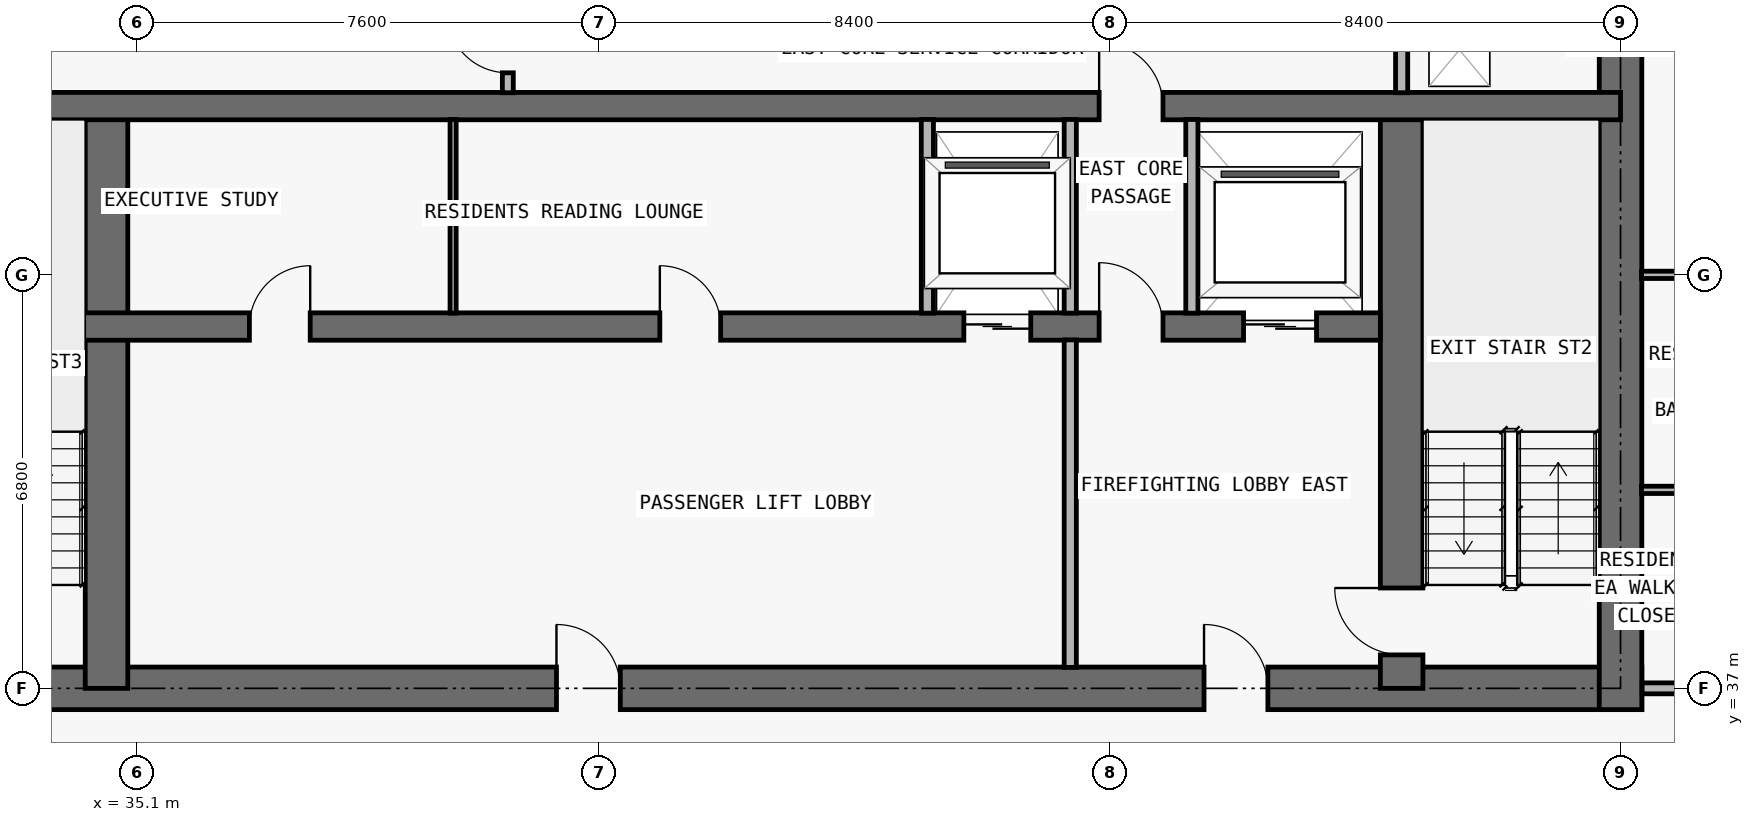
"""IFC4 building model, lengths in metres.
Left out: names, types, materials, properties, quantities, classifications, styles, units other than length and angle.
Written with IfcOpenShell. Run it as: python <this file> out.ifc"""

import sys

from ifc_helpers import new_model, si_unit, direction, frame, frame_2d, origin, place, context, subcontext, project, spatial, rectangle, extrude, element, fill, save


model = new_model("IFC4")
c1 = context("Model", 3, precision=1e-05, world=origin(), true_north=direction((0.0, 1.0)))
c2 = subcontext(c1, "Body", "Model", "MODEL_VIEW")
j1 = project(units=[si_unit("LENGTHUNIT", "METRE"), si_unit("PLANEANGLEUNIT", "RADIAN")], contexts=[c1])
p1 = place(None, origin())
s1 = spatial("IfcSite", under=j1, at=p1, CompositionType="ELEMENT")
p2 = place(p1, origin())
s2 = spatial("IfcBuilding", under=s1, at=p2, CompositionType="ELEMENT")
p3 = place(p2, frame((0.0, 0.0, 201.6)))
s3 = spatial("IfcBuildingStorey", under=s2, at=p3, CompositionType="ELEMENT", Elevation=201.6)
p4 = place(p3, frame((17.95, 37.0, 0.0), z_axis=(0.0, 0.0, 1.0), x_axis=(1.0, 0.0, 0.0)))
e1 = element("IfcWall", 1, at=p4, inside=s3, PredefinedType="SHEAR", context=c2, shape_type="SweptSolid", body=[
    extrude(rectangle(XDim=41.9, YDim=0.7, at=frame_2d((20.95, 0.0))), origin(), (0.0, 0.0, 1.0), 3.05),
])
p5 = place(p4, frame((14.35, 0.0, 0.0)))
e2 = element("IfcOpeningElement", 2, at=p5, cuts=e1, PredefinedType="OPENING", context=c2, shape_type="SweptSolid", body=[
    extrude(rectangle(XDim=1.1, YDim=2.15, at=frame_2d((0.55, 1.075))), frame((0.0, 0.36, 0.0), z_axis=(0.0, -1.0, 0.0), x_axis=(1.0, 0.0, 0.0)), (0.0, 0.0, 1.0), 0.72),
])
p6 = place(p4, frame((6.2, 0.0, 0.0)))
e3 = element("IfcOpeningElement", 3, at=p6, cuts=e1, PredefinedType="OPENING", context=c2, shape_type="SweptSolid", body=[
    extrude(rectangle(XDim=1.05, YDim=2.15, at=frame_2d((0.525, 1.075))), frame((0.0, 0.36, 0.0), z_axis=(0.0, -1.0, 0.0), x_axis=(1.0, 0.0, 0.0)), (0.0, 0.0, 1.0), 0.72),
])
p7 = place(p4, frame((34.7, 0.0, 0.0)))
e4 = element("IfcOpeningElement", 4, at=p7, cuts=e1, PredefinedType="OPENING", context=c2, shape_type="SweptSolid", body=[
    extrude(rectangle(XDim=1.05, YDim=2.15, at=frame_2d((0.525, 1.075))), frame((0.0, 0.36, 0.0), z_axis=(0.0, -1.0, 0.0), x_axis=(1.0, 0.0, 0.0)), (0.0, 0.0, 1.0), 0.72),
])
p8 = place(p4, frame((10.812, 0.0, 0.0)))
e5 = element("IfcOpeningElement", 5, at=p8, cuts=e1, PredefinedType="OPENING", context=c2, shape_type="SweptSolid", body=[
    extrude(rectangle(XDim=1.05, YDim=2.15, at=frame_2d((0.525, 1.075))), frame((0.0, 0.36, 0.0), z_axis=(0.0, -1.0, 0.0), x_axis=(1.0, 0.0, 0.0)), (0.0, 0.0, 1.0), 0.72),
])
p9 = place(p4, frame((24.05, 0.0, 0.0)))
e6 = element("IfcOpeningElement", 6, at=p9, cuts=e1, PredefinedType="OPENING", context=c2, shape_type="SweptSolid", body=[
    extrude(rectangle(XDim=1.05, YDim=2.15, at=frame_2d((0.525, 1.075))), frame((0.0, 0.36, 0.0), z_axis=(0.0, -1.0, 0.0), x_axis=(1.0, 0.0, 0.0)), (0.0, 0.0, 1.0), 0.72),
])
p10 = place(p3, frame((59.5, 36.65, 0.0), z_axis=(0.0, 0.0, 1.0), x_axis=(0.0, 1.0, 0.0)))
e7 = element("IfcWall", 7, at=p10, inside=s3, PredefinedType="SHEAR", context=c2, shape_type="SweptSolid", body=[
    extrude(rectangle(XDim=13.95, YDim=0.7, at=frame_2d((6.975, 0.0))), origin(), (0.0, 0.0, 1.0), 3.05),
])
p11 = place(p3, frame((55.9, 37.0, 0.0), z_axis=(0.0, 0.0, 1.0), x_axis=(0.0, 1.0, 0.0)))
e8 = element("IfcWall", 8, at=p11, inside=s3, PredefinedType="SHEAR", context=c2, shape_type="SweptSolid", body=[
    extrude(rectangle(XDim=9.575, YDim=0.7, at=frame_2d((4.788, 0.0))), origin(), (0.0, 0.0, 1.0), 3.05),
])
p12 = place(p11, frame((0.55, 0.0, 0.0)))
e9 = element("IfcOpeningElement", 9, at=p12, cuts=e8, PredefinedType="OPENING", context=c2, shape_type="SweptSolid", body=[
    extrude(rectangle(XDim=1.1, YDim=2.15, at=frame_2d((0.55, 1.075))), frame((0.0, 0.36, 0.0), z_axis=(0.0, -1.0, 0.0), x_axis=(1.0, 0.0, 0.0)), (0.0, 0.0, 1.0), 0.72),
])
p13 = place(p3, frame((34.6, 37.0, 0.0), z_axis=(0.0, 0.0, 1.0), x_axis=(0.0, 1.0, 0.0)))
e10 = element("IfcWall", 10, at=p13, inside=s3, PredefinedType="SHEAR", context=c2, shape_type="SweptSolid", body=[
    extrude(rectangle(XDim=9.575, YDim=0.7, at=frame_2d((4.788, 0.0))), origin(), (0.0, 0.0, 1.0), 3.05),
])
p14 = place(p3, frame((22.25, 42.95, 0.0), z_axis=(0.0, 0.0, 1.0), x_axis=(1.0, 0.0, 0.0)))
e11 = element("IfcWall", 11, at=p14, inside=s3, PredefinedType="SHEAR", context=c2, shape_type="SweptSolid", body=[
    extrude(rectangle(XDim=33.3, YDim=0.45, at=frame_2d((16.65, 0.0))), origin(), (0.0, 0.0, 1.0), 3.05),
])
p15 = place(p14, frame((1.05, 0.0, 0.0)))
e12 = element("IfcOpeningElement", 12, at=p15, cuts=e11, PredefinedType="OPENING", context=c2, shape_type="SweptSolid", body=[
    extrude(rectangle(XDim=1.2, YDim=2.2, at=frame_2d((0.6, 1.1))), frame((0.0, 0.235, 0.0), z_axis=(0.0, -1.0, 0.0), x_axis=(1.0, 0.0, 0.0)), (0.0, 0.0, 1.0), 0.47),
])
p16 = place(p14, frame((31.05, 0.0, 0.0)))
e13 = element("IfcOpeningElement", 13, at=p16, cuts=e11, PredefinedType="OPENING", context=c2, shape_type="SweptSolid", body=[
    extrude(rectangle(XDim=1.2, YDim=2.2, at=frame_2d((0.6, 1.1))), frame((0.0, 0.235, 0.0), z_axis=(0.0, -1.0, 0.0), x_axis=(1.0, 0.0, 0.0)), (0.0, 0.0, 1.0), 0.47),
])
p17 = place(p14, frame((26.45, 0.0, 0.0)))
e14 = element("IfcOpeningElement", 14, at=p17, cuts=e11, PredefinedType="OPENING", context=c2, shape_type="SweptSolid", body=[
    extrude(rectangle(XDim=1.1, YDim=2.2, at=frame_2d((0.55, 1.1))), frame((0.0, 0.235, 0.0), z_axis=(0.0, -1.0, 0.0), x_axis=(1.0, 0.0, 0.0)), (0.0, 0.0, 1.0), 0.47),
])
p18 = place(p14, frame((5.95, 0.0, 0.0)))
e15 = element("IfcOpeningElement", 15, at=p18, cuts=e11, PredefinedType="OPENING", context=c2, shape_type="SweptSolid", body=[
    extrude(rectangle(XDim=1.1, YDim=2.2, at=frame_2d((0.55, 1.1))), frame((0.0, 0.235, 0.0), z_axis=(0.0, -1.0, 0.0), x_axis=(1.0, 0.0, 0.0)), (0.0, 0.0, 1.0), 0.47),
])
p19 = place(p14, frame((3.625, 0.0, 0.0)))
e16 = element("IfcOpeningElement", 16, at=p19, cuts=e11, PredefinedType="OPENING", context=c2, shape_type="SweptSolid", body=[
    extrude(rectangle(XDim=1.05, YDim=2.15, at=frame_2d((0.525, 1.075))), frame((0.0, 0.235, 0.0), z_axis=(0.0, -1.0, 0.0), x_axis=(1.0, 0.0, 0.0)), (0.0, 0.0, 1.0), 0.47),
])
p20 = place(p14, frame((28.675, 0.0, 0.0)))
e17 = element("IfcOpeningElement", 17, at=p20, cuts=e11, PredefinedType="OPENING", context=c2, shape_type="SweptSolid", body=[
    extrude(rectangle(XDim=1.05, YDim=2.15, at=frame_2d((0.525, 1.075))), frame((0.0, 0.235, 0.0), z_axis=(0.0, -1.0, 0.0), x_axis=(1.0, 0.0, 0.0)), (0.0, 0.0, 1.0), 0.47),
])
p21 = place(p14, frame((14.7, 0.0, 0.0)))
e18 = element("IfcOpeningElement", 18, at=p21, cuts=e11, PredefinedType="OPENING", context=c2, shape_type="SweptSolid", body=[
    extrude(rectangle(XDim=1.0, YDim=2.2, at=frame_2d((0.5, 1.1))), frame((0.0, 0.235, 0.0), z_axis=(0.0, -1.0, 0.0), x_axis=(1.0, 0.0, 0.0)), (0.0, 0.0, 1.0), 0.47),
])
p22 = place(p14, frame((21.45, 0.0, 0.0)))
e19 = element("IfcOpeningElement", 19, at=p22, cuts=e11, PredefinedType="OPENING", context=c2, shape_type="SweptSolid", body=[
    extrude(rectangle(XDim=1.0, YDim=2.2, at=frame_2d((0.5, 1.1))), frame((0.0, 0.235, 0.0), z_axis=(0.0, -1.0, 0.0), x_axis=(1.0, 0.0, 0.0)), (0.0, 0.0, 1.0), 0.47),
])
p23 = place(p3, frame((18.3, 46.575, 0.0), z_axis=(0.0, 0.0, 1.0), x_axis=(1.0, 0.0, 0.0)))
e20 = element("IfcWall", 20, at=p23, inside=s3, PredefinedType="SHEAR", context=c2, shape_type="SweptSolid", body=[
    extrude(rectangle(XDim=41.2, YDim=0.45, at=frame_2d((20.6, 0.0))), origin(), (0.0, 0.0, 1.0), 3.05),
])
p24 = place(p23, frame((7.6, 0.0, 0.0)))
e21 = element("IfcOpeningElement", 21, at=p24, cuts=e20, PredefinedType="OPENING", context=c2, shape_type="SweptSolid", body=[
    extrude(rectangle(XDim=1.0, YDim=2.2, at=frame_2d((0.5, 1.1))), frame((0.0, 0.235, 0.0), z_axis=(0.0, -1.0, 0.0), x_axis=(1.0, 0.0, 0.0)), (0.0, 0.0, 1.0), 0.47),
])
p25 = place(p23, frame((32.625, 0.0, 0.0)))
e22 = element("IfcOpeningElement", 22, at=p25, cuts=e20, PredefinedType="OPENING", context=c2, shape_type="SweptSolid", body=[
    extrude(rectangle(XDim=1.05, YDim=2.15, at=frame_2d((0.525, 1.075))), frame((0.0, 0.235, 0.0), z_axis=(0.0, -1.0, 0.0), x_axis=(1.0, 0.0, 0.0)), (0.0, 0.0, 1.0), 0.47),
])
p26 = place(p3, frame((40.3, 43.17, 0.0), z_axis=(0.0, 0.0, 1.0), x_axis=(0.0, 1.0, 0.0)))
e23 = element("IfcWall", 23, at=p26, inside=s3, PredefinedType="MOVABLE", context=c2, shape_type="SweptSolid", body=[
    extrude(rectangle(XDim=3.185, YDim=0.1, at=frame_2d((1.593, 0.0))), origin(), (0.0, 0.0, 1.0), 3.05),
])
p27 = place(p3, frame((41.2, 46.795, 0.0), z_axis=(0.0, 0.0, 1.0), x_axis=(0.0, 1.0, 0.0)))
e24 = element("IfcWall", 24, at=p27, inside=s3, PredefinedType="PARTITIONING", context=c2, shape_type="SweptSolid", body=[
    extrude(rectangle(XDim=3.16, YDim=0.18, at=frame_2d((1.58, 0.0))), origin(), (0.0, 0.0, 1.0), 3.05),
])
p28 = place(p27, frame((0.327, 0.0, 0.0)))
e25 = element("IfcOpeningElement", 25, at=p28, cuts=e24, PredefinedType="OPENING", context=c2, shape_type="SweptSolid", body=[
    extrude(rectangle(XDim=1.0, YDim=2.2, at=frame_2d((0.5, 1.1))), frame((0.0, 0.1, 0.0), z_axis=(0.0, -1.0, 0.0), x_axis=(1.0, 0.0, 0.0)), (0.0, 0.0, 1.0), 0.2),
])
p29 = place(p3, frame((48.1, 43.17, 0.0), z_axis=(0.0, 0.0, 1.0), x_axis=(0.0, 1.0, 0.0)))
e26 = element("IfcWall", 26, at=p29, inside=s3, PredefinedType="PARTITIONING", context=c2, shape_type="SweptSolid", body=[
    extrude(rectangle(XDim=3.185, YDim=0.2, at=frame_2d((1.593, 0.0))), origin(), (0.0, 0.0, 1.0), 3.05),
])
p30 = place(p3, frame((50.45, 37.345, 0.0), z_axis=(0.0, 0.0, 1.0), x_axis=(0.0, 1.0, 0.0)))
e27 = element("IfcWall", 27, at=p30, inside=s3, PredefinedType="PARTITIONING", context=c2, shape_type="SweptSolid", body=[
    extrude(rectangle(XDim=5.385, YDim=0.2, at=frame_2d((2.692, 0.0))), origin(), (0.0, 0.0, 1.0), 3.05),
])
for number, where, z_axis, x_axis in (
    (28, (50.45, 43.17, 0.0), (0.0, 0.0, 1.0), (0.0, 1.0, 0.0)),
    (29, (52.45, 43.17, 0.0), (0.0, 0.0, 1.0), (0.0, 1.0, 0.0)),
):
    element("IfcWall", number, at=place(p3, frame(where, z_axis=z_axis, x_axis=x_axis)), inside=s3, PredefinedType="PARTITIONING", context=c2, shape_type="SweptSolid", body=[
        extrude(rectangle(XDim=3.185, YDim=0.2, at=frame_2d((1.593, 0.0))), origin(), (0.0, 0.0, 1.0), 3.05),
    ])
p31 = place(p3, frame((55.9, 46.795, 0.0), z_axis=(0.0, 0.0, 1.0), x_axis=(0.0, 1.0, 0.0)))
e30 = element("IfcWall", 30, at=p31, inside=s3, PredefinedType="PARTITIONING", context=c2, shape_type="SweptSolid", body=[
    extrude(rectangle(XDim=3.16, YDim=0.2, at=frame_2d((1.58, 0.0))), origin(), (0.0, 0.0, 1.0), 3.05),
])
p32 = place(p3, frame((59.855, 37.0, 0.0), z_axis=(0.0, 0.0, 1.0), x_axis=(1.0, 0.0, 0.0)))
e31 = element("IfcWall", 31, at=p32, inside=s3, PredefinedType="PARTITIONING", context=c2, shape_type="SweptSolid", body=[
    extrude(rectangle(XDim=7.845, YDim=0.18, at=frame_2d((3.922, 0.0))), origin(), (0.0, 0.0, 1.0), 3.05),
])
p33 = place(p32, frame((3.349, 0.0, 0.0)))
e32 = element("IfcOpeningElement", 32, at=p33, cuts=e31, PredefinedType="OPENING", context=c2, shape_type="SweptSolid", body=[
    extrude(rectangle(XDim=1.0, YDim=2.2, at=frame_2d((0.5, 1.1))), frame((0.0, 0.1, 0.0), z_axis=(0.0, -1.0, 0.0), x_axis=(1.0, 0.0, 0.0)), (0.0, 0.0, 1.0), 0.2),
])
p34 = place(p3, frame((59.845, 40.264, 0.0), z_axis=(0.0, 0.0, 1.0), x_axis=(1.0, 0.0, 0.0)))
e33 = element("IfcWall", 33, at=p34, inside=s3, PredefinedType="PARTITIONING", context=c2, shape_type="SweptSolid", body=[
    extrude(rectangle(XDim=2.305, YDim=0.12, at=frame_2d((1.152, 0.0))), origin(), (0.0, 0.0, 1.0), 3.05),
])
p35 = place(p3, frame((59.845, 43.8, 0.0), z_axis=(0.0, 0.0, 1.0), x_axis=(1.0, 0.0, 0.0)))
e34 = element("IfcWall", 34, at=p35, inside=s3, PredefinedType="PARTITIONING", context=c2, shape_type="SweptSolid", body=[
    extrude(rectangle(XDim=11.56, YDim=0.12, at=frame_2d((5.78, 0.0))), origin(), (0.0, 0.0, 1.0), 2.418),
])
p36 = place(p35, frame((3.409, 0.0, 0.0)))
e35 = element("IfcOpeningElement", 35, at=p36, cuts=e34, PredefinedType="OPENING", context=c2, shape_type="SweptSolid", body=[
    extrude(rectangle(XDim=0.9, YDim=2.15, at=frame_2d((0.45, 1.075))), frame((0.0, 0.07, 0.0), z_axis=(0.0, -1.0, 0.0), x_axis=(1.0, 0.0, 0.0)), (0.0, 0.0, 1.0), 0.14),
])
p37 = place(p35, frame((0.728, 0.0, 0.0)))
e36 = element("IfcOpeningElement", 36, at=p37, cuts=e34, PredefinedType="OPENING", context=c2, shape_type="SweptSolid", body=[
    extrude(rectangle(XDim=0.85, YDim=2.1, at=frame_2d((0.425, 1.05))), frame((0.0, 0.07, 0.0), z_axis=(0.0, -1.0, 0.0), x_axis=(1.0, 0.0, 0.0)), (0.0, 0.0, 1.0), 0.14),
])
p38 = place(p16, origin())
e37 = element("IfcDoor", 37, at=p38, inside=s3, OperationType="DOUBLE_DOOR_SLIDING", PredefinedType="DOOR", context=c2, shape_type="SweptSolid", body=[
    extrude(rectangle(XDim=1.2, YDim=2.2, at=frame_2d((0.6, 1.1))), frame((0.0, 0.025, 0.0), z_axis=(0.0, -1.0, 0.0), x_axis=(1.0, 0.0, 0.0)), (0.0, 0.0, 1.0), 0.05),
])
fill(e13, e37)
p39 = place(p17, origin())
e38 = element("IfcDoor", 38, at=p39, inside=s3, OperationType="DOUBLE_DOOR_SLIDING", PredefinedType="DOOR", context=c2, shape_type="SweptSolid", body=[
    extrude(rectangle(XDim=1.1, YDim=2.2, at=frame_2d((0.55, 1.1))), frame((0.0, 0.025, 0.0), z_axis=(0.0, -1.0, 0.0), x_axis=(1.0, 0.0, 0.0)), (0.0, 0.0, 1.0), 0.05),
])
fill(e14, e38)
p40 = place(p7, origin())
e39 = element("IfcDoor", 39, at=p40, inside=s3, OperationType="SINGLE_SWING_LEFT", PredefinedType="DOOR", context=c2, shape_type="SweptSolid", body=[
    extrude(rectangle(XDim=1.05, YDim=2.15, at=frame_2d((0.525, 1.075))), frame((0.0, 0.025, 0.0), z_axis=(0.0, -1.0, 0.0), x_axis=(1.0, 0.0, 0.0)), (0.0, 0.0, 1.0), 0.05),
])
fill(e4, e39)
p41 = place(p12, origin())
e40 = element("IfcDoor", 40, at=p41, inside=s3, OperationType="SINGLE_SWING_RIGHT", PredefinedType="DOOR", context=c2, shape_type="SweptSolid", body=[
    extrude(rectangle(XDim=1.1, YDim=2.15, at=frame_2d((0.55, 1.075))), frame((0.0, 0.025, 0.0), z_axis=(0.0, -1.0, 0.0), x_axis=(1.0, 0.0, 0.0)), (0.0, 0.0, 1.0), 0.05),
])
fill(e9, e40)
p42 = place(p20, origin())
e41 = element("IfcDoor", 41, at=p42, inside=s3, OperationType="SINGLE_SWING_LEFT", PredefinedType="DOOR", context=c2, shape_type="SweptSolid", body=[
    extrude(rectangle(XDim=1.05, YDim=2.15, at=frame_2d((0.525, 1.075))), frame((0.0, 0.025, 0.0), z_axis=(0.0, -1.0, 0.0), x_axis=(1.0, 0.0, 0.0)), (0.0, 0.0, 1.0), 0.05),
])
fill(e17, e41)
p43 = place(p9, origin())
e42 = element("IfcDoor", 42, at=p43, inside=s3, OperationType="SINGLE_SWING_LEFT", PredefinedType="DOOR", context=c2, shape_type="SweptSolid", body=[
    extrude(rectangle(XDim=1.05, YDim=2.15, at=frame_2d((0.525, 1.075))), frame((0.0, 0.025, 0.0), z_axis=(0.0, -1.0, 0.0), x_axis=(1.0, 0.0, 0.0)), (0.0, 0.0, 1.0), 0.05),
])
fill(e6, e42)
p44 = place(p21, origin())
e43 = element("IfcDoor", 43, at=p44, inside=s3, OperationType="SINGLE_SWING_RIGHT", PredefinedType="DOOR", context=c2, shape_type="SweptSolid", body=[
    extrude(rectangle(XDim=1.0, YDim=2.2, at=frame_2d((0.5, 1.1))), frame((0.0, 0.025, 0.0), z_axis=(0.0, -1.0, 0.0), x_axis=(1.0, 0.0, 0.0)), (0.0, 0.0, 1.0), 0.05),
])
fill(e18, e43)
p45 = place(p22, origin())
e44 = element("IfcDoor", 44, at=p45, inside=s3, OperationType="SINGLE_SWING_LEFT", PredefinedType="DOOR", context=c2, shape_type="SweptSolid", body=[
    extrude(rectangle(XDim=1.0, YDim=2.2, at=frame_2d((0.5, 1.1))), frame((0.0, 0.025, 0.0), z_axis=(0.0, -1.0, 0.0), x_axis=(1.0, 0.0, 0.0)), (0.0, 0.0, 1.0), 0.05),
])
fill(e19, e44)
p46 = place(p25, origin())
e45 = element("IfcDoor", 45, at=p46, inside=s3, OperationType="SINGLE_SWING_LEFT", PredefinedType="DOOR", context=c2, shape_type="SweptSolid", body=[
    extrude(rectangle(XDim=1.05, YDim=2.15, at=frame_2d((0.525, 1.075))), frame((0.0, 0.025, 0.0), z_axis=(0.0, -1.0, 0.0), x_axis=(1.0, 0.0, 0.0)), (0.0, 0.0, 1.0), 0.05),
])
fill(e22, e45)
p47 = place(p28, origin())
e46 = element("IfcDoor", 46, at=p47, inside=s3, OperationType="SINGLE_SWING_RIGHT", PredefinedType="DOOR", context=c2, shape_type="SweptSolid", body=[
    extrude(rectangle(XDim=1.0, YDim=2.2, at=frame_2d((0.5, 1.1))), frame((0.0, 0.025, 0.0), z_axis=(0.0, -1.0, 0.0), x_axis=(1.0, 0.0, 0.0)), (0.0, 0.0, 1.0), 0.05),
])
fill(e25, e46)
save(model, sys.argv[1])
